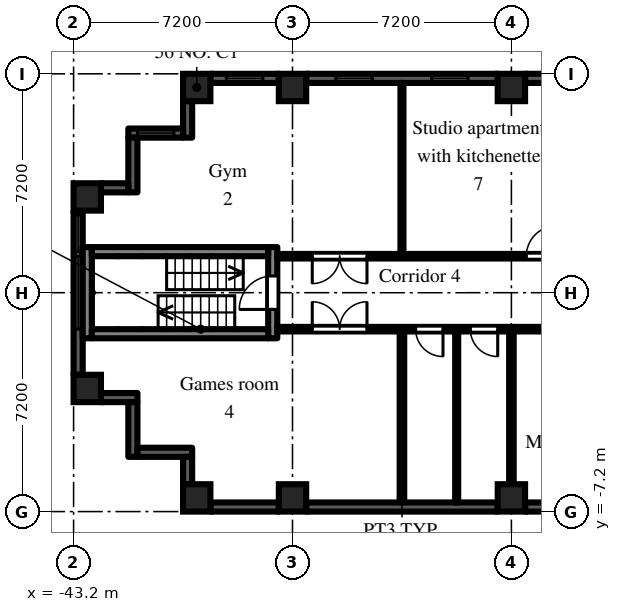
"""IFC4 building model, lengths in metres.
Left out: names, types, materials, properties, quantities, classifications, styles, units other than length and angle.
Written with IfcOpenShell. Run it as: python <this file> out.ifc"""

import sys

from ifc_helpers import new_model, si_unit, direction, frame, frame_2d, origin, origin_2d, place, context, subcontext, project, spatial, rectangle, extrude, element, fill, save


model = new_model("IFC4")
c1 = context("Model", 3, precision=1e-05, world=origin(), true_north=direction((0.0, 1.0)))
c2 = subcontext(c1, "Body", "Model", "MODEL_VIEW")
j1 = project(units=[si_unit("LENGTHUNIT", "METRE"), si_unit("PLANEANGLEUNIT", "RADIAN")], contexts=[c1])
p1 = place(None, origin())
s1 = spatial("IfcSite", under=j1, at=p1, CompositionType="ELEMENT")
p2 = place(p1, origin())
s2 = spatial("IfcBuilding", under=s1, at=p2, CompositionType="ELEMENT")
p3 = place(p2, frame((0.0, 0.0, 59.7)))
s3 = spatial("IfcBuildingStorey", under=s2, at=p3, CompositionType="ELEMENT", Elevation=59.7)
for number, where, z_axis, x_axis in (
    (1, (-42.75, -3.15, 0.0), (0.0, 0.0, 1.0), (1.0, 0.0, 0.0)),
    (2, (-42.75, 3.15, 0.0), (0.0, 0.0, 1.0), (1.0, 0.0, 0.0)),
    (3, (-39.15, -6.75, 0.0), (0.0, 0.0, 1.0), (1.0, 0.0, 0.0)),
    (4, (-39.15, 6.75, 0.0), (0.0, 0.0, 1.0), (1.0, 0.0, 0.0)),
    (5, (-36.0, -6.75, 0.0), (0.0, 0.0, 1.0), (1.0, 0.0, 0.0)),
    (6, (-36.0, 6.75, 0.0), (0.0, 0.0, 1.0), (1.0, 0.0, 0.0)),
    (7, (-28.8, -6.75, 0.0), (0.0, 0.0, 1.0), (1.0, 0.0, 0.0)),
    (8, (-28.8, 6.75, 0.0), (0.0, 0.0, 1.0), (1.0, 0.0, 0.0)),
):
    element("IfcColumn", number, at=place(p3, frame(where, z_axis=z_axis, x_axis=x_axis)), inside=s3, PredefinedType="COLUMN", context=c2, shape_type="SweptSolid", body=[
        extrude(rectangle(XDim=0.9, YDim=0.9, at=origin_2d()), origin(), (0.0, 0.0, 1.0), 3.0),
    ])
p4 = place(p3, frame((-25.2, 7.05, 0.0), z_axis=(0.0, 0.0, 1.0), x_axis=(-1.0, 0.0, 0.0)))
e9 = element("IfcWall", 9, at=p4, inside=s3, PredefinedType="SOLIDWALL", context=c2, shape_type="SweptSolid", body=[
    extrude(rectangle(XDim=3.15, YDim=0.3, at=frame_2d((1.575, 0.0))), origin(), (0.0, 0.0, 1.0), 2.1),
])
p5 = place(p4, frame((0.975, 0.0, 0.2)))
e10 = element("IfcOpeningElement", 10, at=p5, cuts=e9, PredefinedType="OPENING", context=c2, shape_type="SweptSolid", body=[
    extrude(rectangle(XDim=1.2, YDim=1.85, at=frame_2d((0.6, 0.925))), frame((0.0, 0.16, 0.0), z_axis=(0.0, -1.0, 0.0), x_axis=(1.0, 0.0, 0.0)), (0.0, 0.0, 1.0), 0.32),
])
p6 = place(p3, frame((-29.25, 7.05, 0.0), z_axis=(0.0, 0.0, 1.0), x_axis=(-1.0, 0.0, 0.0)))
e11 = element("IfcWall", 11, at=p6, inside=s3, PredefinedType="SOLIDWALL", context=c2, shape_type="SweptSolid", body=[
    extrude(rectangle(XDim=6.3, YDim=0.3, at=frame_2d((3.15, 0.0))), origin(), (0.0, 0.0, 1.0), 2.1),
])
p7 = place(p6, frame((0.975, 0.0, 0.2)))
e12 = element("IfcOpeningElement", 12, at=p7, cuts=e11, PredefinedType="OPENING", context=c2, shape_type="SweptSolid", body=[
    extrude(rectangle(XDim=1.2, YDim=1.85, at=frame_2d((0.6, 0.925))), frame((0.0, 0.16, 0.0), z_axis=(0.0, -1.0, 0.0), x_axis=(1.0, 0.0, 0.0)), (0.0, 0.0, 1.0), 0.32),
])
p8 = place(p6, frame((4.125, 0.0, 0.2)))
e13 = element("IfcOpeningElement", 13, at=p8, cuts=e11, PredefinedType="OPENING", context=c2, shape_type="SweptSolid", body=[
    extrude(rectangle(XDim=1.2, YDim=1.85, at=frame_2d((0.6, 0.925))), frame((0.0, 0.16, 0.0), z_axis=(0.0, -1.0, 0.0), x_axis=(1.0, 0.0, 0.0)), (0.0, 0.0, 1.0), 0.32),
])
p9 = place(p3, frame((-36.45, 7.05, 0.0), z_axis=(0.0, 0.0, 1.0), x_axis=(-1.0, 0.0, 0.0)))
e14 = element("IfcWall", 14, at=p9, inside=s3, PredefinedType="SOLIDWALL", context=c2, shape_type="SweptSolid", body=[
    extrude(rectangle(XDim=2.25, YDim=0.3, at=frame_2d((1.125, 0.0))), origin(), (0.0, 0.0, 1.0), 2.1),
])
p10 = place(p9, frame((0.525, 0.0, 0.2)))
e15 = element("IfcOpeningElement", 15, at=p10, cuts=e14, PredefinedType="OPENING", context=c2, shape_type="SweptSolid", body=[
    extrude(rectangle(XDim=1.2, YDim=1.85, at=frame_2d((0.6, 0.925))), frame((0.0, 0.16, 0.0), z_axis=(0.0, -1.0, 0.0), x_axis=(1.0, 0.0, 0.0)), (0.0, 0.0, 1.0), 0.32),
])
p11 = place(p3, frame((-39.45, 6.3, 0.0), z_axis=(0.0, 0.0, 1.0), x_axis=(0.0, -1.0, 0.0)))
e16 = element("IfcWall", 16, at=p11, inside=s3, PredefinedType="SOLIDWALL", context=c2, shape_type="SweptSolid", body=[
    extrude(rectangle(XDim=1.2, YDim=0.3, at=frame_2d((0.6, 0.0))), origin(), (0.0, 0.0, 1.0), 2.55),
])
p12 = place(p3, frame((-39.6, 5.25, 0.0), z_axis=(0.0, 0.0, 1.0), x_axis=(-1.0, 0.0, 0.0)))
e17 = element("IfcWall", 17, at=p12, inside=s3, PredefinedType="SOLIDWALL", context=c2, shape_type="SweptSolid", body=[
    extrude(rectangle(XDim=1.8, YDim=0.3, at=frame_2d((0.9, 0.0))), origin(), (0.0, 0.0, 1.0), 2.55),
])
p13 = place(p12, frame((0.3, 0.0, 0.2)))
e18 = element("IfcOpeningElement", 18, at=p13, cuts=e17, PredefinedType="OPENING", context=c2, shape_type="SweptSolid", body=[
    extrude(rectangle(XDim=1.2, YDim=1.85, at=frame_2d((0.6, 0.925))), frame((0.0, 0.16, 0.0), z_axis=(0.0, -1.0, 0.0), x_axis=(1.0, 0.0, 0.0)), (0.0, 0.0, 1.0), 0.32),
])
p14 = place(p3, frame((-41.25, 5.1, 0.0), z_axis=(0.0, 0.0, 1.0), x_axis=(0.0, -1.0, 0.0)))
e19 = element("IfcWall", 19, at=p14, inside=s3, PredefinedType="SOLIDWALL", context=c2, shape_type="SweptSolid", body=[
    extrude(rectangle(XDim=1.8, YDim=0.3, at=frame_2d((0.9, 0.0))), origin(), (0.0, 0.0, 1.0), 2.55),
])
p15 = place(p3, frame((-41.4, 3.45, 0.0), z_axis=(0.0, 0.0, 1.0), x_axis=(-1.0, 0.0, 0.0)))
e20 = element("IfcWall", 20, at=p15, inside=s3, PredefinedType="SOLIDWALL", context=c2, shape_type="SweptSolid", body=[
    extrude(rectangle(XDim=0.9, YDim=0.3, at=frame_2d((0.45, 0.0))), origin(), (0.0, 0.0, 1.0), 2.55),
])
p16 = place(p3, frame((-43.05, 2.7, 0.0), z_axis=(0.0, 0.0, 1.0), x_axis=(0.0, -1.0, 0.0)))
e21 = element("IfcWall", 21, at=p16, inside=s3, PredefinedType="SOLIDWALL", context=c2, shape_type="SweptSolid", body=[
    extrude(rectangle(XDim=5.4, YDim=0.3, at=frame_2d((2.7, 0.0))), origin(), (0.0, 0.0, 1.0), 2.1),
])
p17 = place(p16, frame((1.5, 0.0, 0.2)))
e22 = element("IfcOpeningElement", 22, at=p17, cuts=e21, PredefinedType="OPENING", context=c2, shape_type="SweptSolid", body=[
    extrude(rectangle(XDim=2.4, YDim=1.85, at=frame_2d((1.2, 0.925))), frame((0.0, 0.16, 0.0), z_axis=(0.0, -1.0, 0.0), x_axis=(1.0, 0.0, 0.0)), (0.0, 0.0, 1.0), 0.32),
])
p18 = place(p16, frame((0.15, 0.0, 0.2)))
e23 = element("IfcOpeningElement", 23, at=p18, cuts=e21, PredefinedType="OPENING", context=c2, shape_type="SweptSolid", body=[
    extrude(rectangle(XDim=1.2, YDim=1.85, at=frame_2d((0.6, 0.925))), frame((0.0, 0.16, 0.0), z_axis=(0.0, -1.0, 0.0), x_axis=(1.0, 0.0, 0.0)), (0.0, 0.0, 1.0), 0.32),
])
p19 = place(p3, frame((-42.3, -3.45, 0.0), z_axis=(0.0, 0.0, 1.0), x_axis=(1.0, 0.0, 0.0)))
e24 = element("IfcWall", 24, at=p19, inside=s3, PredefinedType="SOLIDWALL", context=c2, shape_type="SweptSolid", body=[
    extrude(rectangle(XDim=1.2, YDim=0.3, at=frame_2d((0.6, 0.0))), origin(), (0.0, 0.0, 1.0), 2.55),
])
p20 = place(p3, frame((-41.25, -3.6, 0.0), z_axis=(0.0, 0.0, 1.0), x_axis=(0.0, -1.0, 0.0)))
e25 = element("IfcWall", 25, at=p20, inside=s3, PredefinedType="SOLIDWALL", context=c2, shape_type="SweptSolid", body=[
    extrude(rectangle(XDim=1.8, YDim=0.3, at=frame_2d((0.9, 0.0))), origin(), (0.0, 0.0, 1.0), 2.55),
])
p21 = place(p3, frame((-41.1, -5.25, 0.0), z_axis=(0.0, 0.0, 1.0), x_axis=(1.0, 0.0, 0.0)))
e26 = element("IfcWall", 26, at=p21, inside=s3, PredefinedType="SOLIDWALL", context=c2, shape_type="SweptSolid", body=[
    extrude(rectangle(XDim=1.8, YDim=0.3, at=frame_2d((0.9, 0.0))), origin(), (0.0, 0.0, 1.0), 2.55),
])
p22 = place(p3, frame((-39.45, -5.4, 0.0), z_axis=(0.0, 0.0, 1.0), x_axis=(0.0, -1.0, 0.0)))
e27 = element("IfcWall", 27, at=p22, inside=s3, PredefinedType="SOLIDWALL", context=c2, shape_type="SweptSolid", body=[
    extrude(rectangle(XDim=0.9, YDim=0.3, at=frame_2d((0.45, 0.0))), origin(), (0.0, 0.0, 1.0), 2.55),
])
p23 = place(p3, frame((-38.7, -7.05, 0.0), z_axis=(0.0, 0.0, 1.0), x_axis=(1.0, 0.0, 0.0)))
e28 = element("IfcWall", 28, at=p23, inside=s3, PredefinedType="SOLIDWALL", context=c2, shape_type="SweptSolid", body=[
    extrude(rectangle(XDim=2.25, YDim=0.3, at=frame_2d((1.125, 0.0))), origin(), (0.0, 0.0, 1.0), 2.1),
])
p24 = place(p3, frame((-35.55, -7.05, 0.0), z_axis=(0.0, 0.0, 1.0), x_axis=(1.0, 0.0, 0.0)))
e29 = element("IfcWall", 29, at=p24, inside=s3, PredefinedType="SOLIDWALL", context=c2, shape_type="SweptSolid", body=[
    extrude(rectangle(XDim=6.3, YDim=0.3, at=frame_2d((3.15, 0.0))), origin(), (0.0, 0.0, 1.0), 2.1),
])
p25 = place(p3, frame((-28.35, -7.05, 0.0), z_axis=(0.0, 0.0, 1.0), x_axis=(1.0, 0.0, 0.0)))
e30 = element("IfcWall", 30, at=p25, inside=s3, PredefinedType="SOLIDWALL", context=c2, shape_type="SweptSolid", body=[
    extrude(rectangle(XDim=3.15, YDim=0.3, at=frame_2d((1.575, 0.0))), origin(), (0.0, 0.0, 1.0), 2.1),
])
p26 = place(p3, frame((-36.65, -1.5, 0.0), z_axis=(0.0, 0.0, 1.0), x_axis=(0.0, 1.0, 0.0)))
e31 = element("IfcWall", 31, at=p26, inside=s3, PredefinedType="SHEAR", context=c2, shape_type="SweptSolid", body=[
    extrude(rectangle(XDim=3.0, YDim=0.3, at=frame_2d((1.5, 0.0))), origin(), (0.0, 0.0, 1.0), 2.55),
])
p27 = place(p26, frame((0.95, 0.0, 0.0)))
e32 = element("IfcOpeningElement", 32, at=p27, cuts=e31, PredefinedType="OPENING", context=c2, shape_type="SweptSolid", body=[
    extrude(rectangle(XDim=1.1, YDim=2.1, at=frame_2d((0.55, 1.05))), frame((0.0, 0.16, 0.0), z_axis=(0.0, -1.0, 0.0), x_axis=(1.0, 0.0, 0.0)), (0.0, 0.0, 1.0), 0.32),
])
p28 = place(p3, frame((-42.75, -1.5, 0.0), z_axis=(0.0, 0.0, 1.0), x_axis=(0.0, 1.0, 0.0)))
e33 = element("IfcWall", 33, at=p28, inside=s3, PredefinedType="SHEAR", context=c2, shape_type="SweptSolid", body=[
    extrude(rectangle(XDim=3.0, YDim=0.3, at=frame_2d((1.5, 0.0))), origin(), (0.0, 0.0, 1.0), 2.55),
])
for number, where, z_axis, x_axis in (
    (34, (-36.8, -1.35, 0.0), (0.0, 0.0, 1.0), (-1.0, 0.0, 0.0)),
    (35, (-36.8, 1.35, 0.0), (0.0, 0.0, 1.0), (-1.0, 0.0, 0.0)),
):
    element("IfcWall", number, at=place(p3, frame(where, z_axis=z_axis, x_axis=x_axis)), inside=s3, PredefinedType="SHEAR", context=c2, shape_type="SweptSolid", body=[
        extrude(rectangle(XDim=5.8, YDim=0.3, at=frame_2d((2.9, 0.0))), origin(), (0.0, 0.0, 1.0), 2.55),
    ])
p29 = place(p3, frame((-36.5, -1.2, 0.0), z_axis=(0.0, 0.0, 1.0), x_axis=(1.0, 0.0, 0.0)))
e36 = element("IfcWall", 36, at=p29, inside=s3, PredefinedType="PARTITIONING", context=c2, shape_type="SweptSolid", body=[
    extrude(rectangle(XDim=14.9, YDim=0.15, at=frame_2d((7.45, 0.0))), origin(), (0.0, 0.0, 1.0), 2.55),
])
p30 = place(p29, frame((10.4, 0.0, 0.0)))
e37 = element("IfcOpeningElement", 37, at=p30, cuts=e36, PredefinedType="OPENING", context=c2, shape_type="SweptSolid", body=[
    extrude(rectangle(XDim=1.8, YDim=2.1, at=frame_2d((0.9, 1.05))), frame((0.0, 0.085, 0.0), z_axis=(0.0, -1.0, 0.0), x_axis=(1.0, 0.0, 0.0)), (0.0, 0.0, 1.0), 0.17),
])
p31 = place(p29, frame((6.35, 0.0, 0.0)))
e38 = element("IfcOpeningElement", 38, at=p31, cuts=e36, PredefinedType="OPENING", context=c2, shape_type="SweptSolid", body=[
    extrude(rectangle(XDim=0.9, YDim=2.1, at=frame_2d((0.45, 1.05))), frame((0.0, 0.085, 0.0), z_axis=(0.0, -1.0, 0.0), x_axis=(1.0, 0.0, 0.0)), (0.0, 0.0, 1.0), 0.17),
])
p32 = place(p29, frame((4.55, 0.0, 0.0)))
e39 = element("IfcOpeningElement", 39, at=p32, cuts=e36, PredefinedType="OPENING", context=c2, shape_type="SweptSolid", body=[
    extrude(rectangle(XDim=0.9, YDim=2.1, at=frame_2d((0.45, 1.05))), frame((0.0, 0.085, 0.0), z_axis=(0.0, -1.0, 0.0), x_axis=(1.0, 0.0, 0.0)), (0.0, 0.0, 1.0), 0.17),
])
p33 = place(p29, frame((1.15, 0.0, 0.0)))
e40 = element("IfcOpeningElement", 40, at=p33, cuts=e36, PredefinedType="OPENING", context=c2, shape_type="SweptSolid", body=[
    extrude(rectangle(XDim=1.8, YDim=2.1, at=frame_2d((0.9, 1.05))), frame((0.0, 0.085, 0.0), z_axis=(0.0, -1.0, 0.0), x_axis=(1.0, 0.0, 0.0)), (0.0, 0.0, 1.0), 0.17),
])
p34 = place(p3, frame((-36.5, 1.2, 0.0), z_axis=(0.0, 0.0, 1.0), x_axis=(1.0, 0.0, 0.0)))
e41 = element("IfcWall", 41, at=p34, inside=s3, PredefinedType="PARTITIONING", context=c2, shape_type="SweptSolid", body=[
    extrude(rectangle(XDim=14.9, YDim=0.15, at=frame_2d((7.45, 0.0))), origin(), (0.0, 0.0, 1.0), 2.55),
])
p35 = place(p34, frame((13.7, 0.0, 0.0)))
e42 = element("IfcOpeningElement", 42, at=p35, cuts=e41, PredefinedType="OPENING", context=c2, shape_type="SweptSolid", body=[
    extrude(rectangle(XDim=1.0, YDim=2.1, at=frame_2d((0.5, 1.05))), frame((0.0, 0.085, 0.0), z_axis=(0.0, -1.0, 0.0), x_axis=(1.0, 0.0, 0.0)), (0.0, 0.0, 1.0), 0.17),
])
p36 = place(p34, frame((8.19, 0.0, 0.0)))
e43 = element("IfcOpeningElement", 43, at=p36, cuts=e41, PredefinedType="OPENING", context=c2, shape_type="SweptSolid", body=[
    extrude(rectangle(XDim=1.0, YDim=2.1, at=frame_2d((0.5, 1.05))), frame((0.0, 0.085, 0.0), z_axis=(0.0, -1.0, 0.0), x_axis=(1.0, 0.0, 0.0)), (0.0, 0.0, 1.0), 0.17),
])
p37 = place(p34, frame((1.15, 0.0, 0.0)))
e44 = element("IfcOpeningElement", 44, at=p37, cuts=e41, PredefinedType="OPENING", context=c2, shape_type="SweptSolid", body=[
    extrude(rectangle(XDim=1.8, YDim=2.1, at=frame_2d((0.9, 1.05))), frame((0.0, 0.085, 0.0), z_axis=(0.0, -1.0, 0.0), x_axis=(1.0, 0.0, 0.0)), (0.0, 0.0, 1.0), 0.17),
])
p38 = place(p3, frame((-32.4, -6.9, 0.0), z_axis=(0.0, 0.0, 1.0), x_axis=(0.0, 1.0, 0.0)))
e45 = element("IfcWall", 45, at=p38, inside=s3, PredefinedType="PARTITIONING", context=c2, shape_type="SweptSolid", body=[
    extrude(rectangle(XDim=5.625, YDim=0.15, at=frame_2d((2.812, 0.0))), origin(), (0.0, 0.0, 1.0), 2.55),
])
for number, where, z_axis, x_axis in (
    (46, (-32.4, 1.275, 0.0), (0.0, 0.0, 1.0), (0.0, 1.0, 0.0)),
    (47, (-30.6, -6.9, 0.0), (0.0, 0.0, 1.0), (0.0, 1.0, 0.0)),
):
    element("IfcWall", number, at=place(p3, frame(where, z_axis=z_axis, x_axis=x_axis)), inside=s3, PredefinedType="PARTITIONING", context=c2, shape_type="SweptSolid", body=[
        extrude(rectangle(XDim=5.625, YDim=0.1, at=frame_2d((2.812, 0.0))), origin(), (0.0, 0.0, 1.0), 2.55),
    ])
p39 = place(p3, frame((-28.8, -6.9, 0.0), z_axis=(0.0, 0.0, 1.0), x_axis=(0.0, 1.0, 0.0)))
e48 = element("IfcWall", 48, at=p39, inside=s3, PredefinedType="PARTITIONING", context=c2, shape_type="SweptSolid", body=[
    extrude(rectangle(XDim=5.625, YDim=0.15, at=frame_2d((2.812, 0.0))), origin(), (0.0, 0.0, 1.0), 2.55),
])
p40 = place(p7, origin())
e49 = element("IfcWindow", 49, at=p40, inside=s3, PartitioningType="SINGLE_PANEL", PredefinedType="WINDOW", context=c2, shape_type="SweptSolid", body=[
    extrude(rectangle(XDim=1.2, YDim=1.85, at=frame_2d((0.6, 0.925))), frame((0.0, 0.03, 0.0), z_axis=(0.0, -1.0, 0.0), x_axis=(1.0, 0.0, 0.0)), (0.0, 0.0, 1.0), 0.06),
])
fill(e12, e49)
p41 = place(p8, origin())
e50 = element("IfcWindow", 50, at=p41, inside=s3, PartitioningType="SINGLE_PANEL", PredefinedType="WINDOW", context=c2, shape_type="SweptSolid", body=[
    extrude(rectangle(XDim=1.2, YDim=1.85, at=frame_2d((0.6, 0.925))), frame((0.0, 0.03, 0.0), z_axis=(0.0, -1.0, 0.0), x_axis=(1.0, 0.0, 0.0)), (0.0, 0.0, 1.0), 0.06),
])
fill(e13, e50)
p42 = place(p10, origin())
e51 = element("IfcWindow", 51, at=p42, inside=s3, PartitioningType="SINGLE_PANEL", PredefinedType="WINDOW", context=c2, shape_type="SweptSolid", body=[
    extrude(rectangle(XDim=1.2, YDim=1.85, at=frame_2d((0.6, 0.925))), frame((0.0, 0.03, 0.0), z_axis=(0.0, -1.0, 0.0), x_axis=(1.0, 0.0, 0.0)), (0.0, 0.0, 1.0), 0.06),
])
fill(e15, e51)
p43 = place(p13, origin())
e52 = element("IfcWindow", 52, at=p43, inside=s3, PartitioningType="SINGLE_PANEL", PredefinedType="WINDOW", context=c2, shape_type="SweptSolid", body=[
    extrude(rectangle(XDim=1.2, YDim=1.85, at=frame_2d((0.6, 0.925))), frame((0.0, 0.03, 0.0), z_axis=(0.0, -1.0, 0.0), x_axis=(1.0, 0.0, 0.0)), (0.0, 0.0, 1.0), 0.06),
])
fill(e18, e52)
p44 = place(p17, origin())
e53 = element("IfcWindow", 53, at=p44, inside=s3, PartitioningType="SINGLE_PANEL", PredefinedType="WINDOW", context=c2, shape_type="SweptSolid", body=[
    extrude(rectangle(XDim=2.4, YDim=1.85, at=frame_2d((1.2, 0.925))), frame((0.0, 0.03, 0.0), z_axis=(0.0, -1.0, 0.0), x_axis=(1.0, 0.0, 0.0)), (0.0, 0.0, 1.0), 0.06),
])
fill(e22, e53)
p45 = place(p18, origin())
e54 = element("IfcWindow", 54, at=p45, inside=s3, PartitioningType="SINGLE_PANEL", PredefinedType="WINDOW", context=c2, shape_type="SweptSolid", body=[
    extrude(rectangle(XDim=1.2, YDim=1.85, at=frame_2d((0.6, 0.925))), frame((0.0, 0.03, 0.0), z_axis=(0.0, -1.0, 0.0), x_axis=(1.0, 0.0, 0.0)), (0.0, 0.0, 1.0), 0.06),
])
fill(e23, e54)
p46 = place(p27, origin())
e55 = element("IfcDoor", 55, at=p46, inside=s3, OperationType="SINGLE_SWING_LEFT", PredefinedType="DOOR", context=c2, shape_type="SweptSolid", body=[
    extrude(rectangle(XDim=1.1, YDim=2.1, at=frame_2d((0.55, 1.05))), frame((0.0, 0.025, 0.0), z_axis=(0.0, -1.0, 0.0), x_axis=(1.0, 0.0, 0.0)), (0.0, 0.0, 1.0), 0.05),
])
fill(e32, e55)
p47 = place(p31, frame((0.9, 0.0, 0.0), z_axis=(0.0, 0.0, 1.0), x_axis=(-1.0, 0.0, 0.0)))
e56 = element("IfcDoor", 56, at=p47, inside=s3, OperationType="SINGLE_SWING_LEFT", PredefinedType="DOOR", context=c2, shape_type="SweptSolid", body=[
    extrude(rectangle(XDim=0.9, YDim=2.1, at=frame_2d((0.45, 1.05))), frame((0.0, 0.025, 0.0), z_axis=(0.0, -1.0, 0.0), x_axis=(1.0, 0.0, 0.0)), (0.0, 0.0, 1.0), 0.05),
])
fill(e38, e56)
p48 = place(p32, frame((0.9, 0.0, 0.0), z_axis=(0.0, 0.0, 1.0), x_axis=(-1.0, 0.0, 0.0)))
e57 = element("IfcDoor", 57, at=p48, inside=s3, OperationType="SINGLE_SWING_LEFT", PredefinedType="DOOR", context=c2, shape_type="SweptSolid", body=[
    extrude(rectangle(XDim=0.9, YDim=2.1, at=frame_2d((0.45, 1.05))), frame((0.0, 0.025, 0.0), z_axis=(0.0, -1.0, 0.0), x_axis=(1.0, 0.0, 0.0)), (0.0, 0.0, 1.0), 0.05),
])
fill(e39, e57)
p49 = place(p33, origin())
e58 = element("IfcDoor", 58, at=p49, inside=s3, OperationType="DOUBLE_DOOR_DOUBLE_SWING", PredefinedType="DOOR", context=c2, shape_type="SweptSolid", body=[
    extrude(rectangle(XDim=1.8, YDim=2.1, at=frame_2d((0.9, 1.05))), frame((0.0, 0.025, 0.0), z_axis=(0.0, -1.0, 0.0), x_axis=(1.0, 0.0, 0.0)), (0.0, 0.0, 1.0), 0.05),
])
fill(e40, e58)
p50 = place(p36, origin())
e59 = element("IfcDoor", 59, at=p50, inside=s3, OperationType="SINGLE_SWING_RIGHT", PredefinedType="DOOR", context=c2, shape_type="SweptSolid", body=[
    extrude(rectangle(XDim=1.0, YDim=2.1, at=frame_2d((0.5, 1.05))), frame((0.0, 0.025, 0.0), z_axis=(0.0, -1.0, 0.0), x_axis=(1.0, 0.0, 0.0)), (0.0, 0.0, 1.0), 0.05),
])
fill(e43, e59)
p51 = place(p37, frame((1.8, 0.0, 0.0), z_axis=(0.0, 0.0, 1.0), x_axis=(-1.0, 0.0, 0.0)))
e60 = element("IfcDoor", 60, at=p51, inside=s3, OperationType="DOUBLE_DOOR_DOUBLE_SWING", PredefinedType="DOOR", context=c2, shape_type="SweptSolid", body=[
    extrude(rectangle(XDim=1.8, YDim=2.1, at=frame_2d((0.9, 1.05))), frame((0.0, 0.025, 0.0), z_axis=(0.0, -1.0, 0.0), x_axis=(1.0, 0.0, 0.0)), (0.0, 0.0, 1.0), 0.05),
])
fill(e44, e60)
save(model, sys.argv[1])
